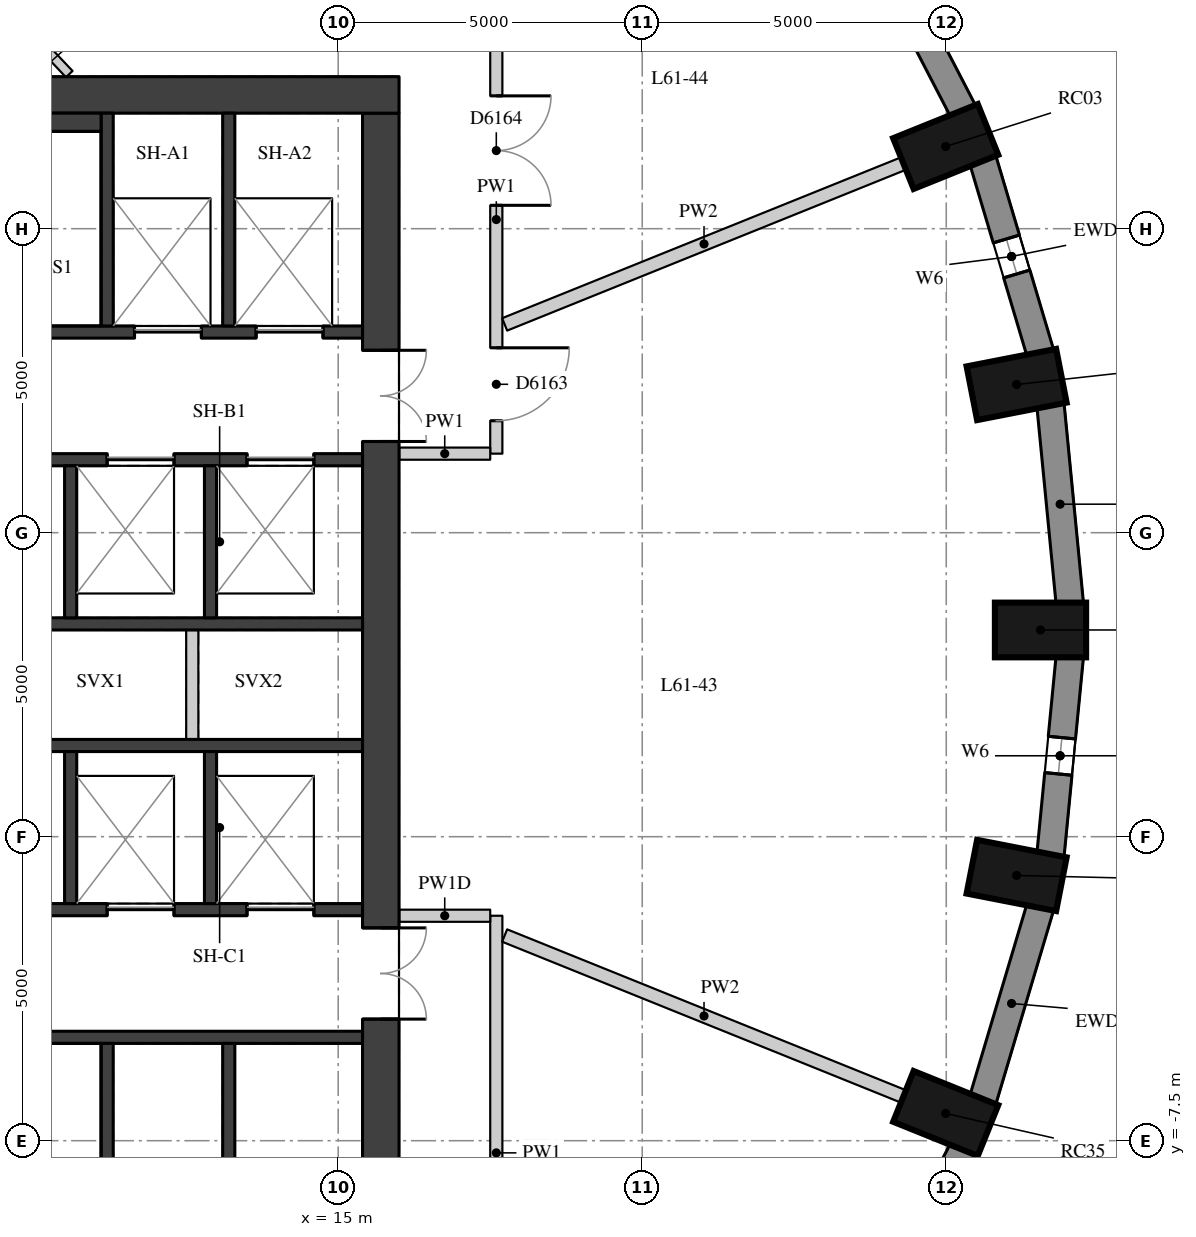
"""IFC4 building model, lengths in metres.
Left out: names, types, materials, properties, quantities, classifications, styles, units other than length and angle.
Written with IfcOpenShell. Run it as: python <this file> out.ifc"""

import sys

from ifc_helpers import new_model, si_unit, direction, frame, frame_2d, origin, origin_2d, place, context, subcontext, project, spatial, rectangle, extrude, element, fill, save


model = new_model("IFC4")
c1 = context("Model", 3, precision=1e-05, world=origin(), true_north=direction((0.0, 1.0)))
c2 = subcontext(c1, "Body", "Model", "MODEL_VIEW")
j1 = project(units=[si_unit("LENGTHUNIT", "METRE"), si_unit("PLANEANGLEUNIT", "RADIAN")], contexts=[c1])
p1 = place(None, origin())
s1 = spatial("IfcSite", under=j1, at=p1, CompositionType="ELEMENT")
p2 = place(p1, origin())
s2 = spatial("IfcBuilding", under=s1, at=p2, CompositionType="ELEMENT")
p3 = place(p2, frame((0.0, 0.0, 215.6)))
s3 = spatial("IfcBuildingStorey", under=s2, at=p3, CompositionType="ELEMENT", Elevation=215.6)
for number, where, z_axis, x_axis in (
    (1, (26.55, 0.9, 0.0), (0.0, 0.0, 1.0), (1.0, 0.0, 0.0)),
    (2, (26.157, 4.937, 0.0), (0.0, 0.0, 1.0), (0.981, 0.192, 0.0)),
    (3, (24.991, 8.852, 0.0), (0.0, 0.0, 1.0), (0.927, 0.374, 0.0)),
    (4, (24.991, -7.052, 0.0), (0.0, 0.0, 1.0), (0.927, -0.374, 0.0)),
    (5, (26.157, -3.137, 0.0), (0.0, 0.0, 1.0), (0.981, -0.192, 0.0)),
):
    element("IfcColumn", number, at=place(p3, frame(where, z_axis=z_axis, x_axis=x_axis)), inside=s3, PredefinedType="COLUMN", context=c2, shape_type="SweptSolid", body=[
        extrude(rectangle(XDim=1.5, YDim=0.9, at=origin_2d()), origin(), (0.0, 0.0, 1.0), 3.3),
    ])
p4 = place(p3, frame((27.032, 1.33, 0.0), z_axis=(0.0, 0.0, 1.0), x_axis=(-0.096824116835, 0.995301507283, 0.0)))
e6 = element("IfcWall", 6, at=p4, inside=s3, PredefinedType="SOLIDWALL", context=c2, shape_type="SweptSolid", body=[
    extrude(rectangle(XDim=3.293, YDim=0.45, at=frame_2d((1.646, 0.0))), origin(), (0.0, 0.0, 1.0), 3.02),
])
p5 = place(p3, frame((26.548, 5.452, 0.0), z_axis=(0.0, 0.0, 1.0), x_axis=(-0.285444972963, 0.958395099847, 0.0)))
e7 = element("IfcWall", 7, at=p5, inside=s3, PredefinedType="SOLIDWALL", context=c2, shape_type="SweptSolid", body=[
    extrude(rectangle(XDim=3.32, YDim=0.45, at=frame_2d((1.66, 0.0))), origin(), (0.0, 0.0, 1.0), 3.02),
])
p6 = place(p5, frame((1.36, 0.0, 0.4)))
e8 = element("IfcOpeningElement", 8, at=p6, cuts=e7, PredefinedType="OPENING", context=c2, shape_type="SweptSolid", body=[
    extrude(rectangle(XDim=0.6, YDim=1.75, at=frame_2d((0.3, 0.875))), frame((0.0, 0.235, 0.0), z_axis=(0.0, -1.0, 0.0), x_axis=(1.0, 0.0, 0.0)), (0.0, 0.0, 1.0), 0.47),
])
p7 = place(p3, frame((25.278, 9.432, 0.0), z_axis=(0.0, 0.0, 1.0), x_axis=(-0.460175500475, 0.887827972505, 0.0)))
e9 = element("IfcWall", 9, at=p7, inside=s3, PredefinedType="SOLIDWALL", context=c2, shape_type="SweptSolid", body=[
    extrude(rectangle(XDim=3.371, YDim=0.45, at=frame_2d((1.685, 0.0))), origin(), (0.0, 0.0, 1.0), 3.02),
])
p8 = place(p3, frame((23.727, -10.624, 0.0), z_axis=(0.0, 0.0, 1.0), x_axis=(0.460175500475, 0.887827972505, 0.0)))
e10 = element("IfcWall", 10, at=p8, inside=s3, PredefinedType="SOLIDWALL", context=c2, shape_type="SweptSolid", body=[
    extrude(rectangle(XDim=3.371, YDim=0.45, at=frame_2d((1.685, 0.0))), origin(), (0.0, 0.0, 1.0), 3.02),
])
p9 = place(p8, frame((1.385, 0.0, 0.4)))
e11 = element("IfcOpeningElement", 11, at=p9, cuts=e10, PredefinedType="OPENING", context=c2, shape_type="SweptSolid", body=[
    extrude(rectangle(XDim=0.6, YDim=1.75, at=frame_2d((0.3, 0.875))), frame((0.0, 0.235, 0.0), z_axis=(0.0, -1.0, 0.0), x_axis=(1.0, 0.0, 0.0)), (0.0, 0.0, 1.0), 0.47),
])
p10 = place(p3, frame((25.6, -6.834, 0.0), z_axis=(0.0, 0.0, 1.0), x_axis=(0.285444972963, 0.958395099847, 0.0)))
e12 = element("IfcWall", 12, at=p10, inside=s3, PredefinedType="SOLIDWALL", context=c2, shape_type="SweptSolid", body=[
    extrude(rectangle(XDim=3.32, YDim=0.45, at=frame_2d((1.66, 0.0))), origin(), (0.0, 0.0, 1.0), 3.02),
])
p11 = place(p3, frame((26.713, -2.808, 0.0), z_axis=(0.0, 0.0, 1.0), x_axis=(0.096816972749, 0.995302202242, 0.0)))
e13 = element("IfcWall", 13, at=p11, inside=s3, PredefinedType="SOLIDWALL", context=c2, shape_type="SweptSolid", body=[
    extrude(rectangle(XDim=3.293, YDim=0.45, at=frame_2d((1.646, 0.0))), origin(), (0.0, 0.0, 1.0), 3.02),
])
p12 = place(p11, frame((1.347, 0.0, 0.4)))
e14 = element("IfcOpeningElement", 14, at=p12, cuts=e13, PredefinedType="OPENING", context=c2, shape_type="SweptSolid", body=[
    extrude(rectangle(XDim=0.6, YDim=1.75, at=frame_2d((0.3, 0.875))), frame((0.0, 0.235, 0.0), z_axis=(0.0, -1.0, 0.0), x_axis=(1.0, 0.0, 0.0)), (0.0, 0.0, 1.0), 0.47),
])
p13 = place(p3, frame((15.7, -9.4, 0.0), z_axis=(0.0, 0.0, 1.0), x_axis=(0.0, 1.0, 0.0)))
e15 = element("IfcWall", 15, at=p13, inside=s3, PredefinedType="SHEAR", context=c2, shape_type="SweptSolid", body=[
    extrude(rectangle(XDim=18.8, YDim=0.6, at=frame_2d((9.4, 0.0))), origin(), (0.0, 0.0, 1.0), 3.02),
])
p14 = place(p13, frame((13.4, 0.0, 0.0)))
e16 = element("IfcOpeningElement", 16, at=p14, cuts=e15, PredefinedType="OPENING", context=c2, shape_type="SweptSolid", body=[
    extrude(rectangle(XDim=1.5, YDim=2.1, at=frame_2d((0.75, 1.05))), frame((0.0, 0.31, 0.0), z_axis=(0.0, -1.0, 0.0), x_axis=(1.0, 0.0, 0.0)), (0.0, 0.0, 1.0), 0.62),
])
p15 = place(p13, frame((3.9, 0.0, 0.0)))
e17 = element("IfcOpeningElement", 17, at=p15, cuts=e15, PredefinedType="OPENING", context=c2, shape_type="SweptSolid", body=[
    extrude(rectangle(XDim=1.5, YDim=2.1, at=frame_2d((0.75, 1.05))), frame((0.0, 0.31, 0.0), z_axis=(0.0, -1.0, 0.0), x_axis=(1.0, 0.0, 0.0)), (0.0, 0.0, 1.0), 0.62),
])
p16 = place(p3, frame((4.0, 9.7, 0.0), z_axis=(0.0, 0.0, 1.0), x_axis=(1.0, 0.0, 0.0)))
e18 = element("IfcWall", 18, at=p16, inside=s3, PredefinedType="SHEAR", context=c2, shape_type="SweptSolid", body=[
    extrude(rectangle(XDim=12.0, YDim=0.6, at=frame_2d((6.0, 0.0))), origin(), (0.0, 0.0, 1.0), 3.02),
])
p17 = place(p3, frame((4.6, 5.8, 0.0), z_axis=(0.0, 0.0, 1.0), x_axis=(1.0, 0.0, 0.0)))
e19 = element("IfcWall", 19, at=p17, inside=s3, PredefinedType="SHEAR", context=c2, shape_type="SweptSolid", body=[
    extrude(rectangle(XDim=10.8, YDim=0.2, at=frame_2d((5.4, 0.0))), origin(), (0.0, 0.0, 1.0), 3.02),
])
p18 = place(p17, frame((7.05, 0.0, 0.0)))
e20 = element("IfcOpeningElement", 20, at=p18, cuts=e19, PredefinedType="OPENING", context=c2, shape_type="SweptSolid", body=[
    extrude(rectangle(XDim=1.1, YDim=2.1, at=frame_2d((0.55, 1.05))), frame((0.0, 0.11, 0.0), z_axis=(0.0, -1.0, 0.0), x_axis=(1.0, 0.0, 0.0)), (0.0, 0.0, 1.0), 0.22),
])
p19 = place(p17, frame((9.05, 0.0, 0.0)))
e21 = element("IfcOpeningElement", 21, at=p19, cuts=e19, PredefinedType="OPENING", context=c2, shape_type="SweptSolid", body=[
    extrude(rectangle(XDim=1.1, YDim=2.1, at=frame_2d((0.55, 1.05))), frame((0.0, 0.11, 0.0), z_axis=(0.0, -1.0, 0.0), x_axis=(1.0, 0.0, 0.0)), (0.0, 0.0, 1.0), 0.22),
])
p20 = place(p3, frame((4.6, 3.7, 0.0), z_axis=(0.0, 0.0, 1.0), x_axis=(1.0, 0.0, 0.0)))
e22 = element("IfcWall", 22, at=p20, inside=s3, PredefinedType="SHEAR", context=c2, shape_type="SweptSolid", body=[
    extrude(rectangle(XDim=10.8, YDim=0.2, at=frame_2d((5.4, 0.0))), origin(), (0.0, 0.0, 1.0), 3.02),
])
p21 = place(p20, frame((6.6, 0.0, 0.0)))
e23 = element("IfcOpeningElement", 23, at=p21, cuts=e22, PredefinedType="OPENING", context=c2, shape_type="SweptSolid", body=[
    extrude(rectangle(XDim=1.1, YDim=2.1, at=frame_2d((0.55, 1.05))), frame((0.0, 0.11, 0.0), z_axis=(0.0, -1.0, 0.0), x_axis=(1.0, 0.0, 0.0)), (0.0, 0.0, 1.0), 0.22),
])
p22 = place(p20, frame((8.9, 0.0, 0.0)))
e24 = element("IfcOpeningElement", 24, at=p22, cuts=e22, PredefinedType="OPENING", context=c2, shape_type="SweptSolid", body=[
    extrude(rectangle(XDim=1.1, YDim=2.1, at=frame_2d((0.55, 1.05))), frame((0.0, 0.11, 0.0), z_axis=(0.0, -1.0, 0.0), x_axis=(1.0, 0.0, 0.0)), (0.0, 0.0, 1.0), 0.22),
])
for number, where, z_axis, x_axis in (
    (25, (4.6, 1.0, 0.0), (0.0, 0.0, 1.0), (1.0, 0.0, 0.0)),
    (26, (4.6, -1.0, 0.0), (0.0, 0.0, 1.0), (1.0, 0.0, 0.0)),
):
    element("IfcWall", number, at=place(p3, frame(where, z_axis=z_axis, x_axis=x_axis)), inside=s3, PredefinedType="SHEAR", context=c2, shape_type="SweptSolid", body=[
        extrude(rectangle(XDim=10.8, YDim=0.2, at=frame_2d((5.4, 0.0))), origin(), (0.0, 0.0, 1.0), 3.02),
    ])
p23 = place(p3, frame((4.6, -3.7, 0.0), z_axis=(0.0, 0.0, 1.0), x_axis=(1.0, 0.0, 0.0)))
e27 = element("IfcWall", 27, at=p23, inside=s3, PredefinedType="SHEAR", context=c2, shape_type="SweptSolid", body=[
    extrude(rectangle(XDim=10.8, YDim=0.2, at=frame_2d((5.4, 0.0))), origin(), (0.0, 0.0, 1.0), 3.02),
])
p24 = place(p23, frame((6.6, 0.0, 0.0)))
e28 = element("IfcOpeningElement", 28, at=p24, cuts=e27, PredefinedType="OPENING", context=c2, shape_type="SweptSolid", body=[
    extrude(rectangle(XDim=1.1, YDim=2.1, at=frame_2d((0.55, 1.05))), frame((0.0, 0.11, 0.0), z_axis=(0.0, -1.0, 0.0), x_axis=(1.0, 0.0, 0.0)), (0.0, 0.0, 1.0), 0.22),
])
p25 = place(p23, frame((8.9, 0.0, 0.0)))
e29 = element("IfcOpeningElement", 29, at=p25, cuts=e27, PredefinedType="OPENING", context=c2, shape_type="SweptSolid", body=[
    extrude(rectangle(XDim=1.1, YDim=2.1, at=frame_2d((0.55, 1.05))), frame((0.0, 0.11, 0.0), z_axis=(0.0, -1.0, 0.0), x_axis=(1.0, 0.0, 0.0)), (0.0, 0.0, 1.0), 0.22),
])
p26 = place(p3, frame((4.6, -5.8, 0.0), z_axis=(0.0, 0.0, 1.0), x_axis=(1.0, 0.0, 0.0)))
e30 = element("IfcWall", 30, at=p26, inside=s3, PredefinedType="SHEAR", context=c2, shape_type="SweptSolid", body=[
    extrude(rectangle(XDim=10.8, YDim=0.2, at=frame_2d((5.4, 0.0))), origin(), (0.0, 0.0, 1.0), 3.02),
])
for number, where, z_axis, x_axis in (
    (31, (11.2, 5.9, 0.0), (0.0, 0.0, 1.0), (0.0, 1.0, 0.0)),
    (32, (11.2, -9.4, 0.0), (0.0, 0.0, 1.0), (0.0, 1.0, 0.0)),
    (33, (13.2, 5.9, 0.0), (0.0, 0.0, 1.0), (0.0, 1.0, 0.0)),
    (34, (13.2, -9.4, 0.0), (0.0, 0.0, 1.0), (0.0, 1.0, 0.0)),
):
    element("IfcWall", number, at=place(p3, frame(where, z_axis=z_axis, x_axis=x_axis)), inside=s3, PredefinedType="SHEAR", context=c2, shape_type="SweptSolid", body=[
        extrude(rectangle(XDim=3.5, YDim=0.2, at=frame_2d((1.75, 0.0))), origin(), (0.0, 0.0, 1.0), 3.02),
    ])
for number, where, z_axis, x_axis in (
    (35, (10.6, 1.1, 0.0), (0.0, 0.0, 1.0), (0.0, 1.0, 0.0)),
    (36, (10.6, -3.6, 0.0), (0.0, 0.0, 1.0), (0.0, 1.0, 0.0)),
    (37, (12.9, 1.1, 0.0), (0.0, 0.0, 1.0), (0.0, 1.0, 0.0)),
    (38, (12.9, -3.6, 0.0), (0.0, 0.0, 1.0), (0.0, 1.0, 0.0)),
):
    element("IfcWall", number, at=place(p3, frame(where, z_axis=z_axis, x_axis=x_axis)), inside=s3, PredefinedType="SHEAR", context=c2, shape_type="SweptSolid", body=[
        extrude(rectangle(XDim=2.5, YDim=0.2, at=frame_2d((1.25, 0.0))), origin(), (0.0, 0.0, 1.0), 3.02),
    ])
p27 = place(p3, frame((12.6, -0.9, 0.0), z_axis=(0.0, 0.0, 1.0), x_axis=(0.0, 1.0, 0.0)))
e39 = element("IfcWall", 39, at=p27, inside=s3, PredefinedType="PARTITIONING", context=c2, shape_type="SweptSolid", body=[
    extrude(rectangle(XDim=1.8, YDim=0.2, at=frame_2d((0.9, 0.0))), origin(), (0.0, 0.0, 1.0), 3.02),
])
p28 = place(p3, frame((6.22, 9.25, 0.0), z_axis=(0.0, 0.0, 1.0), x_axis=(1.0, 0.0, 0.0)))
e40 = element("IfcWall", 40, at=p28, inside=s3, PredefinedType="PARTITIONING", context=c2, shape_type="SweptSolid", body=[
    extrude(rectangle(XDim=4.88, YDim=0.3, at=frame_2d((2.44, 0.0))), origin(), (0.0, 0.0, 1.0), 3.02),
])
p29 = place(p3, frame((17.6, -3.8, 0.0), z_axis=(0.0, 0.0, 1.0), x_axis=(0.0, -1.0, 0.0)))
e41 = element("IfcWall", 41, at=p29, inside=s3, PredefinedType="PARTITIONING", context=c2, shape_type="SweptSolid", body=[
    extrude(rectangle(XDim=7.8, YDim=0.2, at=frame_2d((3.9, 0.0))), origin(), (0.0, 0.0, 1.0), 3.02),
])
p30 = place(p3, frame((17.6, 11.5, 0.0), z_axis=(0.0, 0.0, 1.0), x_axis=(0.0, -1.0, 0.0)))
e42 = element("IfcWall", 42, at=p30, inside=s3, PredefinedType="PARTITIONING", context=c2, shape_type="SweptSolid", body=[
    extrude(rectangle(XDim=7.7, YDim=0.2, at=frame_2d((3.85, 0.0))), origin(), (0.0, 0.0, 1.0), 3.02),
])
p31 = place(p30, frame((5.959, 0.0, 0.0)))
e43 = element("IfcOpeningElement", 43, at=p31, cuts=e42, PredefinedType="OPENING", context=c2, shape_type="SweptSolid", body=[
    extrude(rectangle(XDim=1.2, YDim=2.1, at=frame_2d((0.6, 1.05))), frame((0.0, 0.11, 0.0), z_axis=(0.0, -1.0, 0.0), x_axis=(1.0, 0.0, 0.0)), (0.0, 0.0, 1.0), 0.22),
])
p32 = place(p30, frame((1.815, 0.0, 0.0)))
e44 = element("IfcOpeningElement", 44, at=p32, cuts=e42, PredefinedType="OPENING", context=c2, shape_type="SweptSolid", body=[
    extrude(rectangle(XDim=1.8, YDim=2.1, at=frame_2d((0.9, 1.05))), frame((0.0, 0.11, 0.0), z_axis=(0.0, -1.0, 0.0), x_axis=(1.0, 0.0, 0.0)), (0.0, 0.0, 1.0), 0.22),
])
p33 = place(p3, frame((17.5, 3.8, 0.0), z_axis=(0.0, 0.0, 1.0), x_axis=(-1.0, 0.0, 0.0)))
e45 = element("IfcWall", 45, at=p33, inside=s3, PredefinedType="PARTITIONING", context=c2, shape_type="SweptSolid", body=[
    extrude(rectangle(XDim=1.496, YDim=0.2, at=frame_2d((0.748, 0.0))), origin(), (0.0, 0.0, 1.0), 3.02),
])
p34 = place(p3, frame((16.004, -3.8, 0.0), z_axis=(0.0, 0.0, 1.0), x_axis=(1.0, 0.0, 0.0)))
e46 = element("IfcWall", 46, at=p34, inside=s3, PredefinedType="PARTITIONING", context=c2, shape_type="SweptSolid", body=[
    extrude(rectangle(XDim=1.496, YDim=0.2, at=frame_2d((0.748, 0.0))), origin(), (0.0, 0.0, 1.0), 2.47),
])
p35 = place(p3, frame((8.896, 11.823, 0.0), z_axis=(0.0, 0.0, 1.0), x_axis=(0.686471254033, -0.727156941373, 0.0)))
e47 = element("IfcWall", 47, at=p35, inside=s3, PredefinedType="PARTITIONING", context=c2, shape_type="SweptSolid", body=[
    extrude(rectangle(XDim=2.448, YDim=0.15, at=frame_2d((1.224, 0.0))), origin(), (0.0, 0.0, 1.0), 3.02),
])
p36 = place(p3, frame((24.295, 8.571, 0.0), z_axis=(0.0, 0.0, 1.0), x_axis=(-0.927386999215, -0.374103399728, 0.0)))
e48 = element("IfcWall", 48, at=p36, inside=s3, PredefinedType="PARTITIONING", context=c2, shape_type="SweptSolid", body=[
    extrude(rectangle(XDim=7.072, YDim=0.22, at=frame_2d((3.536, 0.0))), origin(), (0.0, 0.0, 1.0), 3.02),
])
p37 = place(p3, frame((24.295, -6.771, 0.0), z_axis=(0.0, 0.0, 1.0), x_axis=(-0.927375021142, 0.374133091509, 0.0)))
e49 = element("IfcWall", 49, at=p37, inside=s3, PredefinedType="PARTITIONING", context=c2, shape_type="SweptSolid", body=[
    extrude(rectangle(XDim=7.072, YDim=0.22, at=frame_2d((3.536, 0.0))), origin(), (0.0, 0.0, 1.0), 3.02),
])
p38 = place(p6, origin())
e50 = element("IfcWindow", 50, at=p38, inside=s3, PartitioningType="SINGLE_PANEL", PredefinedType="WINDOW", context=c2, shape_type="SweptSolid", body=[
    extrude(rectangle(XDim=0.6, YDim=1.75, at=frame_2d((0.3, 0.875))), frame((0.0, 0.035, 0.0), z_axis=(0.0, -1.0, 0.0), x_axis=(1.0, 0.0, 0.0)), (0.0, 0.0, 1.0), 0.06),
])
fill(e8, e50)
p39 = place(p12, origin())
e51 = element("IfcWindow", 51, at=p39, inside=s3, PartitioningType="SINGLE_PANEL", PredefinedType="WINDOW", context=c2, shape_type="SweptSolid", body=[
    extrude(rectangle(XDim=0.6, YDim=1.75, at=frame_2d((0.3, 0.875))), frame((0.0, 0.035, 0.0), z_axis=(0.0, -1.0, 0.0), x_axis=(1.0, 0.0, 0.0)), (0.0, 0.0, 1.0), 0.06),
])
fill(e14, e51)
p40 = place(p14, origin())
e52 = element("IfcDoor", 52, at=p40, inside=s3, OperationType="DOUBLE_DOOR_SINGLE_SWING", PredefinedType="DOOR", context=c2, shape_type="SweptSolid", body=[
    extrude(rectangle(XDim=1.5, YDim=2.1, at=frame_2d((0.75, 1.05))), frame((0.0, 0.025, 0.0), z_axis=(0.0, -1.0, 0.0), x_axis=(1.0, 0.0, 0.0)), (0.0, 0.0, 1.0), 0.05),
])
fill(e16, e52)
p41 = place(p15, origin())
e53 = element("IfcDoor", 53, at=p41, inside=s3, OperationType="DOUBLE_DOOR_SINGLE_SWING", PredefinedType="DOOR", context=c2, shape_type="SweptSolid", body=[
    extrude(rectangle(XDim=1.5, YDim=2.1, at=frame_2d((0.75, 1.05))), frame((0.0, 0.025, 0.0), z_axis=(0.0, -1.0, 0.0), x_axis=(1.0, 0.0, 0.0)), (0.0, 0.0, 1.0), 0.05),
])
fill(e17, e53)
p42 = place(p18, origin())
e54 = element("IfcDoor", 54, at=p42, inside=s3, OperationType="DOUBLE_DOOR_SLIDING", PredefinedType="DOOR", context=c2, shape_type="SweptSolid", body=[
    extrude(rectangle(XDim=1.1, YDim=2.1, at=frame_2d((0.55, 1.05))), frame((0.0, 0.025, 0.0), z_axis=(0.0, -1.0, 0.0), x_axis=(1.0, 0.0, 0.0)), (0.0, 0.0, 1.0), 0.05),
])
fill(e20, e54)
p43 = place(p19, origin())
e55 = element("IfcDoor", 55, at=p43, inside=s3, OperationType="DOUBLE_DOOR_SLIDING", PredefinedType="DOOR", context=c2, shape_type="SweptSolid", body=[
    extrude(rectangle(XDim=1.1, YDim=2.1, at=frame_2d((0.55, 1.05))), frame((0.0, 0.025, 0.0), z_axis=(0.0, -1.0, 0.0), x_axis=(1.0, 0.0, 0.0)), (0.0, 0.0, 1.0), 0.05),
])
fill(e21, e55)
p44 = place(p21, origin())
e56 = element("IfcDoor", 56, at=p44, inside=s3, OperationType="DOUBLE_DOOR_SLIDING", PredefinedType="DOOR", context=c2, shape_type="SweptSolid", body=[
    extrude(rectangle(XDim=1.1, YDim=2.1, at=frame_2d((0.55, 1.05))), frame((0.0, 0.025, 0.0), z_axis=(0.0, -1.0, 0.0), x_axis=(1.0, 0.0, 0.0)), (0.0, 0.0, 1.0), 0.05),
])
fill(e23, e56)
p45 = place(p22, origin())
e57 = element("IfcDoor", 57, at=p45, inside=s3, OperationType="DOUBLE_DOOR_SLIDING", PredefinedType="DOOR", context=c2, shape_type="SweptSolid", body=[
    extrude(rectangle(XDim=1.1, YDim=2.1, at=frame_2d((0.55, 1.05))), frame((0.0, 0.025, 0.0), z_axis=(0.0, -1.0, 0.0), x_axis=(1.0, 0.0, 0.0)), (0.0, 0.0, 1.0), 0.05),
])
fill(e24, e57)
p46 = place(p24, origin())
e58 = element("IfcDoor", 58, at=p46, inside=s3, OperationType="DOUBLE_DOOR_SLIDING", PredefinedType="DOOR", context=c2, shape_type="SweptSolid", body=[
    extrude(rectangle(XDim=1.1, YDim=2.1, at=frame_2d((0.55, 1.05))), frame((0.0, 0.025, 0.0), z_axis=(0.0, -1.0, 0.0), x_axis=(1.0, 0.0, 0.0)), (0.0, 0.0, 1.0), 0.05),
])
fill(e28, e58)
p47 = place(p25, origin())
e59 = element("IfcDoor", 59, at=p47, inside=s3, OperationType="DOUBLE_DOOR_SLIDING", PredefinedType="DOOR", context=c2, shape_type="SweptSolid", body=[
    extrude(rectangle(XDim=1.1, YDim=2.1, at=frame_2d((0.55, 1.05))), frame((0.0, 0.025, 0.0), z_axis=(0.0, -1.0, 0.0), x_axis=(1.0, 0.0, 0.0)), (0.0, 0.0, 1.0), 0.05),
])
fill(e29, e59)
p48 = place(p31, origin())
e60 = element("IfcDoor", 60, at=p48, inside=s3, OperationType="SINGLE_SWING_LEFT", PredefinedType="DOOR", context=c2, shape_type="SweptSolid", body=[
    extrude(rectangle(XDim=1.2, YDim=2.1, at=frame_2d((0.6, 1.05))), frame((0.0, 0.025, 0.0), z_axis=(0.0, -1.0, 0.0), x_axis=(1.0, 0.0, 0.0)), (0.0, 0.0, 1.0), 0.05),
])
fill(e43, e60)
p49 = place(p32, origin())
e61 = element("IfcDoor", 61, at=p49, inside=s3, OperationType="DOUBLE_DOOR_SINGLE_SWING", PredefinedType="DOOR", context=c2, shape_type="SweptSolid", body=[
    extrude(rectangle(XDim=1.8, YDim=2.1, at=frame_2d((0.9, 1.05))), frame((0.0, 0.025, 0.0), z_axis=(0.0, -1.0, 0.0), x_axis=(1.0, 0.0, 0.0)), (0.0, 0.0, 1.0), 0.05),
])
fill(e44, e61)
save(model, sys.argv[1])
